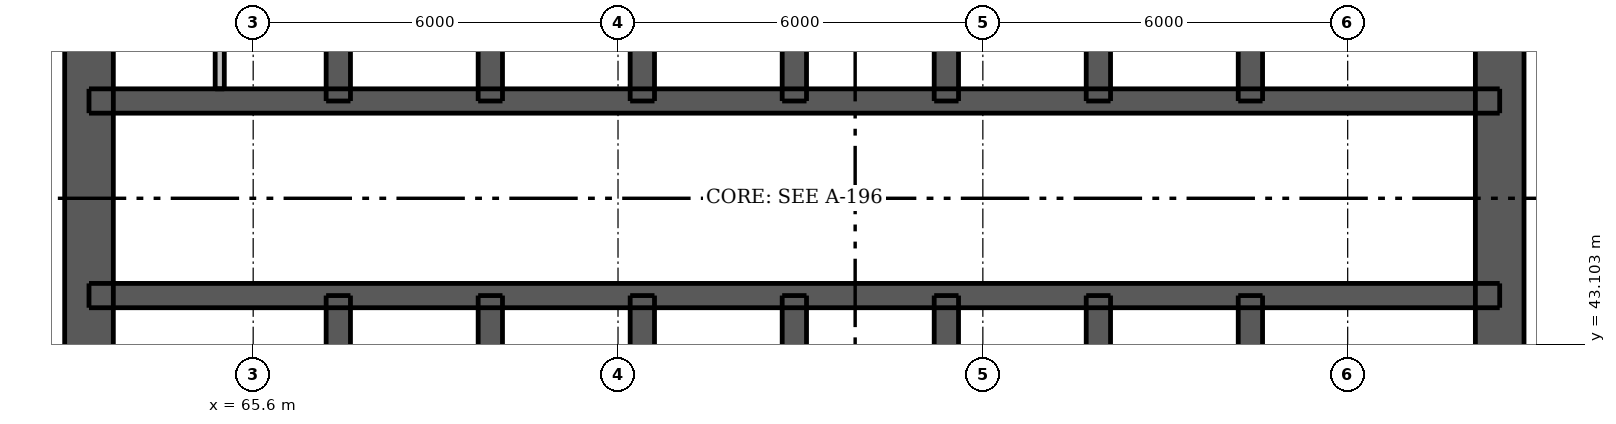
"""IFC4 building model, lengths in metres.
Left out: names, types, materials, properties, quantities, classifications, styles, units other than length and angle.
Written with IfcOpenShell. Run it as: python <this file> out.ifc"""

import sys

from ifc_helpers import new_model, si_unit, direction, frame, frame_2d, origin, place, context, subcontext, project, spatial, rectangle, extrude, element, fill, save


model = new_model("IFC4")
c1 = context("Model", 3, precision=1e-05, world=origin(), true_north=direction((0.0, 1.0)))
c2 = subcontext(c1, "Body", "Model", "MODEL_VIEW")
j1 = project(units=[si_unit("LENGTHUNIT", "METRE"), si_unit("PLANEANGLEUNIT", "RADIAN")], contexts=[c1])
p1 = place(None, origin())
s1 = spatial("IfcSite", under=j1, at=p1, CompositionType="ELEMENT")
p2 = place(p1, origin())
s2 = spatial("IfcBuilding", under=s1, at=p2, CompositionType="ELEMENT")
p3 = place(p2, frame((0.0, 0.0, 115.0)))
s3 = spatial("IfcBuildingStorey", under=s2, at=p3, CompositionType="ELEMENT", Elevation=115.0)
p4 = place(p3, frame((62.9, 33.5, 0.0), z_axis=(0.0, 0.0, 1.0), x_axis=(0.0, 1.0, 0.0)))
e1 = element("IfcWall", 1, at=p4, inside=s3, PredefinedType="SHEAR", context=c2, shape_type="SweptSolid", body=[
    extrude(rectangle(XDim=24.0, YDim=0.8, at=frame_2d((12.0, 0.0))), origin(), (0.0, 0.0, 1.0), 3.05),
])
p5 = place(p4, frame((11.2, 0.0, 0.0)))
e2 = element("IfcOpeningElement", 2, at=p5, cuts=e1, PredefinedType="OPENING", context=c2, shape_type="SweptSolid", body=[
    extrude(rectangle(XDim=1.6, YDim=2.1, at=frame_2d((0.8, 1.05))), frame((0.0, 0.41, 0.0), z_axis=(0.0, -1.0, 0.0), x_axis=(1.0, 0.0, 0.0)), (0.0, 0.0, 1.0), 0.82),
])
p6 = place(p3, frame((86.1, 33.5, 0.0), z_axis=(0.0, 0.0, 1.0), x_axis=(0.0, 1.0, 0.0)))
e3 = element("IfcWall", 3, at=p6, inside=s3, PredefinedType="SHEAR", context=c2, shape_type="SweptSolid", body=[
    extrude(rectangle(XDim=24.0, YDim=0.8, at=frame_2d((12.0, 0.0))), origin(), (0.0, 0.0, 1.0), 3.05),
])
p7 = place(p6, frame((11.2, 0.0, 0.0)))
e4 = element("IfcOpeningElement", 4, at=p7, cuts=e3, PredefinedType="OPENING", context=c2, shape_type="SweptSolid", body=[
    extrude(rectangle(XDim=1.6, YDim=2.1, at=frame_2d((0.8, 1.05))), frame((0.0, 0.41, 0.0), z_axis=(0.0, -1.0, 0.0), x_axis=(1.0, 0.0, 0.0)), (0.0, 0.0, 1.0), 0.82),
])
p8 = place(p3, frame((62.9, 43.9, 0.0), z_axis=(0.0, 0.0, 1.0), x_axis=(1.0, 0.0, 0.0)))
e5 = element("IfcWall", 5, at=p8, inside=s3, PredefinedType="SHEAR", context=c2, shape_type="SweptSolid", body=[
    extrude(rectangle(XDim=23.2, YDim=0.4, at=frame_2d((11.6, 0.0))), origin(), (0.0, 0.0, 1.0), 3.05),
])
p9 = place(p8, frame((1.7, 0.0, 0.0)))
e6 = element("IfcOpeningElement", 6, at=p9, cuts=e5, PredefinedType="OPENING", context=c2, shape_type="SweptSolid", body=[
    extrude(rectangle(XDim=0.9, YDim=2.1, at=frame_2d((0.45, 1.05))), frame((0.0, 0.21, 0.0), z_axis=(0.0, -1.0, 0.0), x_axis=(1.0, 0.0, 0.0)), (0.0, 0.0, 1.0), 0.42),
])
p10 = place(p8, frame((20.6, 0.0, 0.0)))
e7 = element("IfcOpeningElement", 7, at=p10, cuts=e5, PredefinedType="OPENING", context=c2, shape_type="SweptSolid", body=[
    extrude(rectangle(XDim=0.9, YDim=2.1, at=frame_2d((0.45, 1.05))), frame((0.0, 0.21, 0.0), z_axis=(0.0, -1.0, 0.0), x_axis=(1.0, 0.0, 0.0)), (0.0, 0.0, 1.0), 0.42),
])
p11 = place(p8, frame((4.8, 0.0, 0.0)))
e8 = element("IfcOpeningElement", 8, at=p11, cuts=e5, PredefinedType="OPENING", context=c2, shape_type="SweptSolid", body=[
    extrude(rectangle(XDim=1.1, YDim=2.1, at=frame_2d((0.55, 1.05))), frame((0.0, 0.21, 0.0), z_axis=(0.0, -1.0, 0.0), x_axis=(1.0, 0.0, 0.0)), (0.0, 0.0, 1.0), 0.42),
])
p12 = place(p8, frame((7.3, 0.0, 0.0)))
e9 = element("IfcOpeningElement", 9, at=p12, cuts=e5, PredefinedType="OPENING", context=c2, shape_type="SweptSolid", body=[
    extrude(rectangle(XDim=1.1, YDim=2.1, at=frame_2d((0.55, 1.05))), frame((0.0, 0.21, 0.0), z_axis=(0.0, -1.0, 0.0), x_axis=(1.0, 0.0, 0.0)), (0.0, 0.0, 1.0), 0.42),
])
p13 = place(p8, frame((9.8, 0.0, 0.0)))
e10 = element("IfcOpeningElement", 10, at=p13, cuts=e5, PredefinedType="OPENING", context=c2, shape_type="SweptSolid", body=[
    extrude(rectangle(XDim=1.1, YDim=2.1, at=frame_2d((0.55, 1.05))), frame((0.0, 0.21, 0.0), z_axis=(0.0, -1.0, 0.0), x_axis=(1.0, 0.0, 0.0)), (0.0, 0.0, 1.0), 0.42),
])
p14 = place(p8, frame((12.3, 0.0, 0.0)))
e11 = element("IfcOpeningElement", 11, at=p14, cuts=e5, PredefinedType="OPENING", context=c2, shape_type="SweptSolid", body=[
    extrude(rectangle(XDim=1.1, YDim=2.1, at=frame_2d((0.55, 1.05))), frame((0.0, 0.21, 0.0), z_axis=(0.0, -1.0, 0.0), x_axis=(1.0, 0.0, 0.0)), (0.0, 0.0, 1.0), 0.42),
])
p15 = place(p8, frame((14.8, 0.0, 0.0)))
e12 = element("IfcOpeningElement", 12, at=p15, cuts=e5, PredefinedType="OPENING", context=c2, shape_type="SweptSolid", body=[
    extrude(rectangle(XDim=1.1, YDim=2.1, at=frame_2d((0.55, 1.05))), frame((0.0, 0.21, 0.0), z_axis=(0.0, -1.0, 0.0), x_axis=(1.0, 0.0, 0.0)), (0.0, 0.0, 1.0), 0.42),
])
p16 = place(p8, frame((17.3, 0.0, 0.0)))
e13 = element("IfcOpeningElement", 13, at=p16, cuts=e5, PredefinedType="OPENING", context=c2, shape_type="SweptSolid", body=[
    extrude(rectangle(XDim=1.1, YDim=2.1, at=frame_2d((0.55, 1.05))), frame((0.0, 0.21, 0.0), z_axis=(0.0, -1.0, 0.0), x_axis=(1.0, 0.0, 0.0)), (0.0, 0.0, 1.0), 0.42),
])
p17 = place(p3, frame((62.9, 47.1, 0.0), z_axis=(0.0, 0.0, 1.0), x_axis=(1.0, 0.0, 0.0)))
e14 = element("IfcWall", 14, at=p17, inside=s3, PredefinedType="SHEAR", context=c2, shape_type="SweptSolid", body=[
    extrude(rectangle(XDim=23.2, YDim=0.4, at=frame_2d((11.6, 0.0))), origin(), (0.0, 0.0, 1.0), 3.05),
])
p18 = place(p17, frame((0.825, 0.0, 0.0)))
e15 = element("IfcOpeningElement", 15, at=p18, cuts=e14, PredefinedType="OPENING", context=c2, shape_type="SweptSolid", body=[
    extrude(rectangle(XDim=0.9, YDim=2.1, at=frame_2d((0.45, 1.05))), frame((0.0, 0.21, 0.0), z_axis=(0.0, -1.0, 0.0), x_axis=(1.0, 0.0, 0.0)), (0.0, 0.0, 1.0), 0.42),
])
p19 = place(p17, frame((2.575, 0.0, 0.0)))
e16 = element("IfcOpeningElement", 16, at=p19, cuts=e14, PredefinedType="OPENING", context=c2, shape_type="SweptSolid", body=[
    extrude(rectangle(XDim=0.9, YDim=2.1, at=frame_2d((0.45, 1.05))), frame((0.0, 0.21, 0.0), z_axis=(0.0, -1.0, 0.0), x_axis=(1.0, 0.0, 0.0)), (0.0, 0.0, 1.0), 0.42),
])
p20 = place(p17, frame((20.6, 0.0, 0.0)))
e17 = element("IfcOpeningElement", 17, at=p20, cuts=e14, PredefinedType="OPENING", context=c2, shape_type="SweptSolid", body=[
    extrude(rectangle(XDim=0.9, YDim=2.1, at=frame_2d((0.45, 1.05))), frame((0.0, 0.21, 0.0), z_axis=(0.0, -1.0, 0.0), x_axis=(1.0, 0.0, 0.0)), (0.0, 0.0, 1.0), 0.42),
])
p21 = place(p3, frame((67.0, 33.9, 0.0), z_axis=(0.0, 0.0, 1.0), x_axis=(0.0, 1.0, 0.0)))
e18 = element("IfcWall", 18, at=p21, inside=s3, PredefinedType="SHEAR", context=c2, shape_type="SweptSolid", body=[
    extrude(rectangle(XDim=10.0, YDim=0.4, at=frame_2d((5.0, 0.0))), origin(), (0.0, 0.0, 1.0), 3.05),
])
p22 = place(p21, frame((0.6, 0.0, 0.0)))
e19 = element("IfcOpeningElement", 19, at=p22, cuts=e18, PredefinedType="OPENING", context=c2, shape_type="SweptSolid", body=[
    extrude(rectangle(XDim=1.1, YDim=2.1, at=frame_2d((0.55, 1.05))), frame((0.0, 0.21, 0.0), z_axis=(0.0, -1.0, 0.0), x_axis=(1.0, 0.0, 0.0)), (0.0, 0.0, 1.0), 0.42),
])
for number, where, z_axis, x_axis in (
    (20, (67.0, 47.1, 0.0), (0.0, 0.0, 1.0), (0.0, 1.0, 0.0)),
    (21, (82.0, 33.9, 0.0), (0.0, 0.0, 1.0), (0.0, 1.0, 0.0)),
    (22, (82.0, 47.1, 0.0), (0.0, 0.0, 1.0), (0.0, 1.0, 0.0)),
):
    element("IfcWall", number, at=place(p3, frame(where, z_axis=z_axis, x_axis=x_axis)), inside=s3, PredefinedType="SHEAR", context=c2, shape_type="SweptSolid", body=[
        extrude(rectangle(XDim=10.0, YDim=0.4, at=frame_2d((5.0, 0.0))), origin(), (0.0, 0.0, 1.0), 3.05),
    ])
for number, where, z_axis, x_axis in (
    (23, (69.5, 41.0, 0.0), (0.0, 0.0, 1.0), (0.0, 1.0, 0.0)),
    (24, (69.5, 47.1, 0.0), (0.0, 0.0, 1.0), (0.0, 1.0, 0.0)),
    (25, (72.0, 41.0, 0.0), (0.0, 0.0, 1.0), (0.0, 1.0, 0.0)),
    (26, (72.0, 47.1, 0.0), (0.0, 0.0, 1.0), (0.0, 1.0, 0.0)),
    (27, (74.5, 41.0, 0.0), (0.0, 0.0, 1.0), (0.0, 1.0, 0.0)),
    (28, (74.5, 47.1, 0.0), (0.0, 0.0, 1.0), (0.0, 1.0, 0.0)),
    (29, (77.0, 41.0, 0.0), (0.0, 0.0, 1.0), (0.0, 1.0, 0.0)),
    (30, (77.0, 47.1, 0.0), (0.0, 0.0, 1.0), (0.0, 1.0, 0.0)),
    (31, (79.5, 41.0, 0.0), (0.0, 0.0, 1.0), (0.0, 1.0, 0.0)),
    (32, (79.5, 47.1, 0.0), (0.0, 0.0, 1.0), (0.0, 1.0, 0.0)),
):
    element("IfcWall", number, at=place(p3, frame(where, z_axis=z_axis, x_axis=x_axis)), inside=s3, PredefinedType="SHEAR", context=c2, shape_type="SweptSolid", body=[
        extrude(rectangle(XDim=2.9, YDim=0.4, at=frame_2d((1.45, 0.0))), origin(), (0.0, 0.0, 1.0), 3.05),
    ])
p23 = place(p3, frame((65.05, 47.3, 0.0), z_axis=(0.0, 0.0, 1.0), x_axis=(0.0, 1.0, 0.0)))
e33 = element("IfcWall", 33, at=p23, inside=s3, PredefinedType="PLUMBINGWALL", context=c2, shape_type="SweptSolid", body=[
    extrude(rectangle(XDim=2.5, YDim=0.15, at=frame_2d((1.25, 0.0))), origin(), (0.0, 0.0, 1.0), 3.05),
])
p24 = place(p5, origin())
e34 = element("IfcDoor", 34, at=p24, inside=s3, OperationType="DOUBLE_DOOR_SINGLE_SWING", PredefinedType="DOOR", context=c2, shape_type="SweptSolid", body=[
    extrude(rectangle(XDim=1.6, YDim=2.1, at=frame_2d((0.8, 1.05))), frame((0.0, -0.337, 0.0), z_axis=(0.0, -1.0, 0.0), x_axis=(1.0, 0.0, 0.0)), (0.0, 0.0, 1.0), 0.05),
])
fill(e2, e34)
p25 = place(p7, origin())
e35 = element("IfcDoor", 35, at=p25, inside=s3, OperationType="DOUBLE_DOOR_SINGLE_SWING", PredefinedType="DOOR", context=c2, shape_type="SweptSolid", body=[
    extrude(rectangle(XDim=1.6, YDim=2.1, at=frame_2d((0.8, 1.05))), frame((0.0, 0.388, 0.0), z_axis=(0.0, -1.0, 0.0), x_axis=(1.0, 0.0, 0.0)), (0.0, 0.0, 1.0), 0.05),
])
fill(e4, e35)
p26 = place(p9, origin())
e36 = element("IfcDoor", 36, at=p26, inside=s3, OperationType="SINGLE_SWING_LEFT", PredefinedType="DOOR", context=c2, shape_type="SweptSolid", body=[
    extrude(rectangle(XDim=0.9, YDim=2.1, at=frame_2d((0.45, 1.05))), frame((0.0, -0.138, 0.0), z_axis=(0.0, -1.0, 0.0), x_axis=(1.0, 0.0, 0.0)), (0.0, 0.0, 1.0), 0.05),
])
fill(e6, e36)
p27 = place(p10, origin())
e37 = element("IfcDoor", 37, at=p27, inside=s3, OperationType="SINGLE_SWING_LEFT", PredefinedType="DOOR", context=c2, shape_type="SweptSolid", body=[
    extrude(rectangle(XDim=0.9, YDim=2.1, at=frame_2d((0.45, 1.05))), frame((0.0, -0.138, 0.0), z_axis=(0.0, -1.0, 0.0), x_axis=(1.0, 0.0, 0.0)), (0.0, 0.0, 1.0), 0.05),
])
fill(e7, e37)
p28 = place(p18, origin())
e38 = element("IfcDoor", 38, at=p28, inside=s3, OperationType="SINGLE_SWING_LEFT", PredefinedType="DOOR", context=c2, shape_type="SweptSolid", body=[
    extrude(rectangle(XDim=0.9, YDim=2.1, at=frame_2d((0.45, 1.05))), frame((0.0, 0.188, 0.0), z_axis=(0.0, -1.0, 0.0), x_axis=(1.0, 0.0, 0.0)), (0.0, 0.0, 1.0), 0.05),
])
fill(e15, e38)
p29 = place(p19, origin())
e39 = element("IfcDoor", 39, at=p29, inside=s3, OperationType="SINGLE_SWING_RIGHT", PredefinedType="DOOR", context=c2, shape_type="SweptSolid", body=[
    extrude(rectangle(XDim=0.9, YDim=2.1, at=frame_2d((0.45, 1.05))), frame((0.0, 0.188, 0.0), z_axis=(0.0, -1.0, 0.0), x_axis=(1.0, 0.0, 0.0)), (0.0, 0.0, 1.0), 0.05),
])
fill(e16, e39)
p30 = place(p20, origin())
e40 = element("IfcDoor", 40, at=p30, inside=s3, OperationType="SINGLE_SWING_LEFT", PredefinedType="DOOR", context=c2, shape_type="SweptSolid", body=[
    extrude(rectangle(XDim=0.9, YDim=2.1, at=frame_2d((0.45, 1.05))), frame((0.0, 0.188, 0.0), z_axis=(0.0, -1.0, 0.0), x_axis=(1.0, 0.0, 0.0)), (0.0, 0.0, 1.0), 0.05),
])
fill(e17, e40)
p31 = place(p11, origin())
e41 = element("IfcDoor", 41, at=p31, inside=s3, OperationType="DOUBLE_DOOR_SLIDING", PredefinedType="DOOR", context=c2, shape_type="SweptSolid", body=[
    extrude(rectangle(XDim=1.1, YDim=2.1, at=frame_2d((0.55, 1.05))), frame((0.0, 0.025, 0.0), z_axis=(0.0, -1.0, 0.0), x_axis=(1.0, 0.0, 0.0)), (0.0, 0.0, 1.0), 0.05),
])
fill(e8, e41)
p32 = place(p12, origin())
e42 = element("IfcDoor", 42, at=p32, inside=s3, OperationType="DOUBLE_DOOR_SLIDING", PredefinedType="DOOR", context=c2, shape_type="SweptSolid", body=[
    extrude(rectangle(XDim=1.1, YDim=2.1, at=frame_2d((0.55, 1.05))), frame((0.0, 0.025, 0.0), z_axis=(0.0, -1.0, 0.0), x_axis=(1.0, 0.0, 0.0)), (0.0, 0.0, 1.0), 0.05),
])
fill(e9, e42)
p33 = place(p13, origin())
e43 = element("IfcDoor", 43, at=p33, inside=s3, OperationType="DOUBLE_DOOR_SLIDING", PredefinedType="DOOR", context=c2, shape_type="SweptSolid", body=[
    extrude(rectangle(XDim=1.1, YDim=2.1, at=frame_2d((0.55, 1.05))), frame((0.0, 0.025, 0.0), z_axis=(0.0, -1.0, 0.0), x_axis=(1.0, 0.0, 0.0)), (0.0, 0.0, 1.0), 0.05),
])
fill(e10, e43)
p34 = place(p14, origin())
e44 = element("IfcDoor", 44, at=p34, inside=s3, OperationType="DOUBLE_DOOR_SLIDING", PredefinedType="DOOR", context=c2, shape_type="SweptSolid", body=[
    extrude(rectangle(XDim=1.1, YDim=2.1, at=frame_2d((0.55, 1.05))), frame((0.0, 0.025, 0.0), z_axis=(0.0, -1.0, 0.0), x_axis=(1.0, 0.0, 0.0)), (0.0, 0.0, 1.0), 0.05),
])
fill(e11, e44)
p35 = place(p15, origin())
e45 = element("IfcDoor", 45, at=p35, inside=s3, OperationType="DOUBLE_DOOR_SLIDING", PredefinedType="DOOR", context=c2, shape_type="SweptSolid", body=[
    extrude(rectangle(XDim=1.1, YDim=2.1, at=frame_2d((0.55, 1.05))), frame((0.0, 0.025, 0.0), z_axis=(0.0, -1.0, 0.0), x_axis=(1.0, 0.0, 0.0)), (0.0, 0.0, 1.0), 0.05),
])
fill(e12, e45)
p36 = place(p16, origin())
e46 = element("IfcDoor", 46, at=p36, inside=s3, OperationType="DOUBLE_DOOR_SLIDING", PredefinedType="DOOR", context=c2, shape_type="SweptSolid", body=[
    extrude(rectangle(XDim=1.1, YDim=2.1, at=frame_2d((0.55, 1.05))), frame((0.0, 0.025, 0.0), z_axis=(0.0, -1.0, 0.0), x_axis=(1.0, 0.0, 0.0)), (0.0, 0.0, 1.0), 0.05),
])
fill(e13, e46)
save(model, sys.argv[1])
